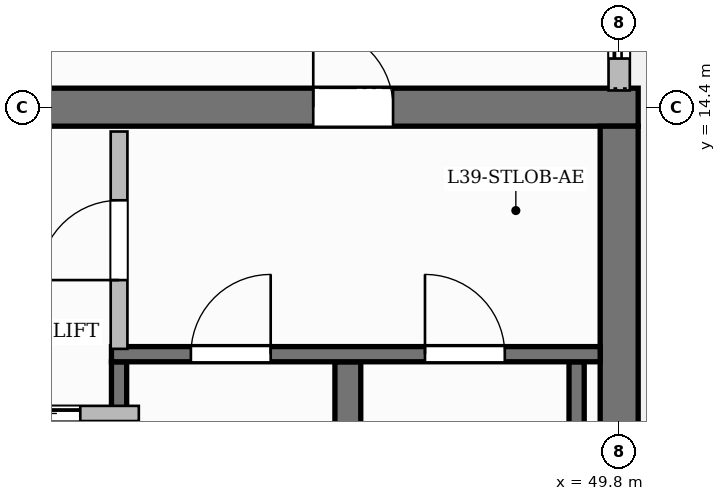
"""IFC4 building model, lengths in metres.
Left out: names, types, materials, properties, quantities, classifications, styles, units other than length and angle.
Written with IfcOpenShell. Run it as: python <this file> out.ifc"""

import sys

from ifc_helpers import new_model, si_unit, direction, frame, frame_2d, origin, place, context, subcontext, project, spatial, rectangle, extrude, source, transform, mapped, element, fill, save


model = new_model("IFC4")
c1 = context("Model", 3, precision=1e-05, world=origin(), true_north=direction((0.0, 1.0)))
c2 = subcontext(c1, "Body", "Model", "MODEL_VIEW")
j1 = project(units=[si_unit("LENGTHUNIT", "METRE"), si_unit("PLANEANGLEUNIT", "RADIAN")], contexts=[c1])
p1 = place(None, origin())
s1 = spatial("IfcSite", under=j1, at=p1, CompositionType="ELEMENT")
p2 = place(p1, origin())
s2 = spatial("IfcBuilding", under=s1, at=p2, CompositionType="ELEMENT")
p3 = place(p2, frame((0.0, 0.0, 158.0)))
s3 = spatial("IfcBuildingStorey", under=s2, at=p3, CompositionType="ELEMENT", Elevation=158.0)
p4 = place(p3, frame((34.55, 14.4, 0.0), z_axis=(0.0, 0.0, 1.0), x_axis=(1.0, 0.0, 0.0)))
e1 = element("IfcWall", 1, at=p4, inside=s3, PredefinedType="SHEAR", context=c2, shape_type="SweptSolid", body=[
    extrude(rectangle(XDim=15.5, YDim=0.5, at=frame_2d((7.75, 0.0))), origin(), (0.0, 0.0, 1.0), 3.85),
])
p5 = place(p4, frame((5.38, 0.0, 0.0)))
e2 = element("IfcOpeningElement", 2, at=p5, cuts=e1, PredefinedType="OPENING", context=c2, shape_type="SweptSolid", body=[
    extrude(rectangle(XDim=1.5, YDim=2.2, at=frame_2d((0.75, 1.1))), frame((0.0, 0.26, 0.0), z_axis=(0.0, -1.0, 0.0), x_axis=(1.0, 0.0, 0.0)), (0.0, 0.0, 1.0), 0.52),
])
p6 = place(p4, frame((1.595, 0.0, 0.0)))
e3 = element("IfcOpeningElement", 3, at=p6, cuts=e1, PredefinedType="OPENING", context=c2, shape_type="SweptSolid", body=[
    extrude(rectangle(XDim=1.05, YDim=2.15, at=frame_2d((0.525, 1.075))), frame((0.0, 0.26, 0.0), z_axis=(0.0, -1.0, 0.0), x_axis=(1.0, 0.0, 0.0)), (0.0, 0.0, 1.0), 0.52),
])
p7 = place(p4, frame((11.225, 0.0, 0.0)))
e4 = element("IfcOpeningElement", 4, at=p7, cuts=e1, PredefinedType="OPENING", context=c2, shape_type="SweptSolid", body=[
    extrude(rectangle(XDim=1.05, YDim=2.15, at=frame_2d((0.525, 1.075))), frame((0.0, 0.26, 0.0), z_axis=(0.0, -1.0, 0.0), x_axis=(1.0, 0.0, 0.0)), (0.0, 0.0, 1.0), 0.52),
])
p8 = place(p3, frame((49.8, 3.85, 0.0), z_axis=(0.0, 0.0, 1.0), x_axis=(0.0, 1.0, 0.0)))
e5 = element("IfcWall", 5, at=p8, inside=s3, PredefinedType="SHEAR", context=c2, shape_type="SweptSolid", body=[
    extrude(rectangle(XDim=10.3, YDim=0.5, at=frame_2d((5.15, 0.0))), origin(), (0.0, 0.0, 1.0), 3.85),
])
p9 = place(p3, frame((43.22, 4.1, 0.0), z_axis=(0.0, 0.0, 1.0), x_axis=(0.0, 1.0, 0.0)))
e6 = element("IfcWall", 6, at=p9, inside=s3, PredefinedType="SHEAR", context=c2, shape_type="SweptSolid", body=[
    extrude(rectangle(XDim=6.95, YDim=0.2, at=frame_2d((3.475, 0.0))), origin(), (0.0, 0.0, 1.0), 3.85),
])
p10 = place(p3, frame((46.23, 4.1, 0.0), z_axis=(0.0, 0.0, 1.0), x_axis=(0.0, 1.0, 0.0)))
e7 = element("IfcWall", 7, at=p10, inside=s3, PredefinedType="SHEAR", context=c2, shape_type="SweptSolid", body=[
    extrude(rectangle(XDim=6.95, YDim=0.34, at=frame_2d((3.475, 0.0))), origin(), (0.0, 0.0, 1.0), 3.85),
])
p11 = place(p3, frame((49.24, 4.1, 0.0), z_axis=(0.0, 0.0, 1.0), x_axis=(0.0, 1.0, 0.0)))
e8 = element("IfcWall", 8, at=p11, inside=s3, PredefinedType="SHEAR", context=c2, shape_type="SweptSolid", body=[
    extrude(rectangle(XDim=6.95, YDim=0.2, at=frame_2d((3.475, 0.0))), origin(), (0.0, 0.0, 1.0), 3.85),
])
p12 = place(p3, frame((43.12, 11.15, 0.0), z_axis=(0.0, 0.0, 1.0), x_axis=(1.0, 0.0, 0.0)))
e9 = element("IfcWall", 9, at=p12, inside=s3, PredefinedType="SHEAR", context=c2, shape_type="SweptSolid", body=[
    extrude(rectangle(XDim=6.43, YDim=0.2, at=frame_2d((3.215, 0.0))), origin(), (0.0, 0.0, 1.0), 3.85),
])
p13 = place(p12, frame((1.045, 0.0, 0.0)))
e10 = element("IfcOpeningElement", 10, at=p13, cuts=e9, PredefinedType="OPENING", context=c2, shape_type="SweptSolid", body=[
    extrude(rectangle(XDim=1.05, YDim=2.2, at=frame_2d((0.525, 1.1))), frame((0.0, 0.11, 0.0), z_axis=(0.0, -1.0, 0.0), x_axis=(1.0, 0.0, 0.0)), (0.0, 0.0, 1.0), 0.22),
])
p14 = place(p12, frame((4.125, 0.0, 0.0)))
e11 = element("IfcOpeningElement", 11, at=p14, cuts=e9, PredefinedType="OPENING", context=c2, shape_type="SweptSolid", body=[
    extrude(rectangle(XDim=1.05, YDim=2.2, at=frame_2d((0.525, 1.1))), frame((0.0, 0.11, 0.0), z_axis=(0.0, -1.0, 0.0), x_axis=(1.0, 0.0, 0.0)), (0.0, 0.0, 1.0), 0.22),
])
p15 = place(p3, frame((43.22, 11.22, 0.0), z_axis=(0.0, 0.0, 1.0), x_axis=(0.0, 1.0, 0.0)))
e12 = element("IfcWall", 12, at=p15, inside=s3, PredefinedType="PARTITIONING", context=c2, shape_type="SweptSolid", body=[
    extrude(rectangle(XDim=2.86, YDim=0.22, at=frame_2d((1.43, 0.0))), origin(), (0.0, 0.0, 1.0), 3.6),
])
p16 = place(p15, frame((0.905, 0.0, 0.0)))
e13 = element("IfcOpeningElement", 13, at=p16, cuts=e12, PredefinedType="OPENING", context=c2, shape_type="SweptSolid", body=[
    extrude(rectangle(XDim=1.05, YDim=2.15, at=frame_2d((0.525, 1.075))), frame((0.0, 0.12, 0.0), z_axis=(0.0, -1.0, 0.0), x_axis=(1.0, 0.0, 0.0)), (0.0, 0.0, 1.0), 0.24),
])
p17 = place(p3, frame((40.84, 10.37, 0.0), z_axis=(0.0, 0.0, 1.0), x_axis=(1.0, 0.0, 0.0)))
e14 = element("IfcWall", 14, at=p17, inside=s3, PredefinedType="PARTITIONING", context=c2, shape_type="SweptSolid", body=[
    extrude(rectangle(XDim=2.64, YDim=0.2, at=frame_2d((1.32, 0.0))), origin(), (0.0, 0.0, 1.0), 3.6),
])
p18 = place(p17, frame((0.77, 0.0, 0.0)))
e15 = element("IfcOpeningElement", 15, at=p18, cuts=e14, PredefinedType="OPENING", context=c2, shape_type="SweptSolid", body=[
    extrude(rectangle(XDim=1.1, YDim=2.2, at=frame_2d((0.55, 1.1))), frame((0.0, 0.11, 0.0), z_axis=(0.0, -1.0, 0.0), x_axis=(1.0, 0.0, 0.0)), (0.0, 0.0, 1.0), 0.22),
])
p19 = place(p3, frame((49.8, 14.62, 0.0), z_axis=(0.0, 0.0, 1.0), x_axis=(0.0, 1.0, 0.0)))
e16 = element("IfcWall", 16, at=p19, inside=s3, PredefinedType="SOLIDWALL", context=c2, shape_type="SweptSolid", body=[
    extrude(rectangle(XDim=6.93, YDim=0.28, at=frame_2d((3.465, 0.0))), origin(), (0.0, 0.0, 1.0), 3.085),
])
p20 = place(p19, frame((0.42, 0.0, 0.0)))
e17 = element("IfcOpeningElement", 17, at=p20, cuts=e16, PredefinedType="OPENING", context=c2, shape_type="SweptSolid", body=[
    extrude(rectangle(XDim=1.2, YDim=2.2, at=frame_2d((0.6, 1.1))), frame((0.0, 0.15, 0.0), z_axis=(0.0, -1.0, 0.0), x_axis=(1.0, 0.0, 0.0)), (0.0, 0.0, 1.0), 0.3),
])
p21 = place(p19, frame((3.384, 0.0, 0.8)))
e18 = element("IfcOpeningElement", 18, at=p21, cuts=e16, PredefinedType="OPENING", context=c2, shape_type="SweptSolid", body=[
    extrude(rectangle(XDim=1.8, YDim=1.85, at=frame_2d((0.9, 0.925))), frame((0.0, 0.15, 0.0), z_axis=(0.0, -1.0, 0.0), x_axis=(1.0, 0.0, 0.0)), (0.0, 0.0, 1.0), 0.3),
])
m1 = source(origin(), c2, "Body", "SweptSolid", [
    extrude(rectangle(XDim=1.05, YDim=2.2, at=frame_2d((0.525, 1.1))), frame((0.0, 0.025, 0.0), z_axis=(0.0, -1.0, 0.0), x_axis=(1.0, 0.0, 0.0)), (0.0, 0.0, 1.0), 0.05),
])
p22 = place(p13, origin())
e19 = element("IfcDoor", 19, at=p22, inside=s3, OperationType="SINGLE_SWING_RIGHT", PredefinedType="DOOR", context=c2, shape_type="MappedRepresentation", body=[
    mapped(m1, transform((0.0, 0.0, 0.0), scale=1.0)),
])
fill(e10, e19)
p23 = place(p14, origin())
e20 = element("IfcDoor", 20, at=p23, inside=s3, OperationType="SINGLE_SWING_LEFT", PredefinedType="DOOR", context=c2, shape_type="MappedRepresentation", body=[
    mapped(m1, transform((0.0, 0.0, 0.0), scale=1.0)),
])
fill(e11, e20)
m2 = source(origin(), c2, "Body", "SweptSolid", [
    extrude(rectangle(XDim=1.05, YDim=2.15, at=frame_2d((0.525, 1.075))), frame((0.0, 0.025, 0.0), z_axis=(0.0, -1.0, 0.0), x_axis=(1.0, 0.0, 0.0)), (0.0, 0.0, 1.0), 0.05),
])
p24 = place(p16, origin())
e21 = element("IfcDoor", 21, at=p24, inside=s3, OperationType="SINGLE_SWING_LEFT", PredefinedType="DOOR", context=c2, shape_type="MappedRepresentation", body=[
    mapped(m2, transform((0.0, 0.0, 0.0), scale=1.0)),
])
fill(e13, e21)
p25 = place(p7, origin())
e22 = element("IfcDoor", 22, at=p25, inside=s3, OperationType="SINGLE_SWING_LEFT", PredefinedType="DOOR", context=c2, shape_type="MappedRepresentation", body=[
    mapped(m2, transform((0.0, 0.0, 0.0), scale=1.0)),
])
fill(e4, e22)
m3 = source(origin(), c2, "Body", "SweptSolid", [
    extrude(rectangle(XDim=1.1, YDim=2.2, at=frame_2d((0.55, 1.1))), frame((0.0, 0.025, 0.0), z_axis=(0.0, -1.0, 0.0), x_axis=(1.0, 0.0, 0.0)), (0.0, 0.0, 1.0), 0.05),
])
p26 = place(p18, origin())
e23 = element("IfcDoor", 23, at=p26, inside=s3, OperationType="SLIDING_TO_LEFT", PredefinedType="DOOR", context=c2, shape_type="MappedRepresentation", body=[
    mapped(m3, transform((0.0, 0.0, 0.0), scale=1.0)),
])
fill(e15, e23)
m4 = source(origin(), c2, "Body", "SweptSolid", [
    extrude(rectangle(XDim=1.2, YDim=2.2, at=frame_2d((0.6, 1.1))), frame((0.0, 0.025, 0.0), z_axis=(0.0, -1.0, 0.0), x_axis=(1.0, 0.0, 0.0)), (0.0, 0.0, 1.0), 0.05),
])
p27 = place(p20, origin())
e24 = element("IfcDoor", 24, at=p27, inside=s3, OperationType="SLIDING_TO_LEFT", PredefinedType="DOOR", context=c2, shape_type="MappedRepresentation", body=[
    mapped(m4, transform((0.0, 0.0, 0.0), scale=1.0)),
])
fill(e17, e24)
save(model, sys.argv[1])
